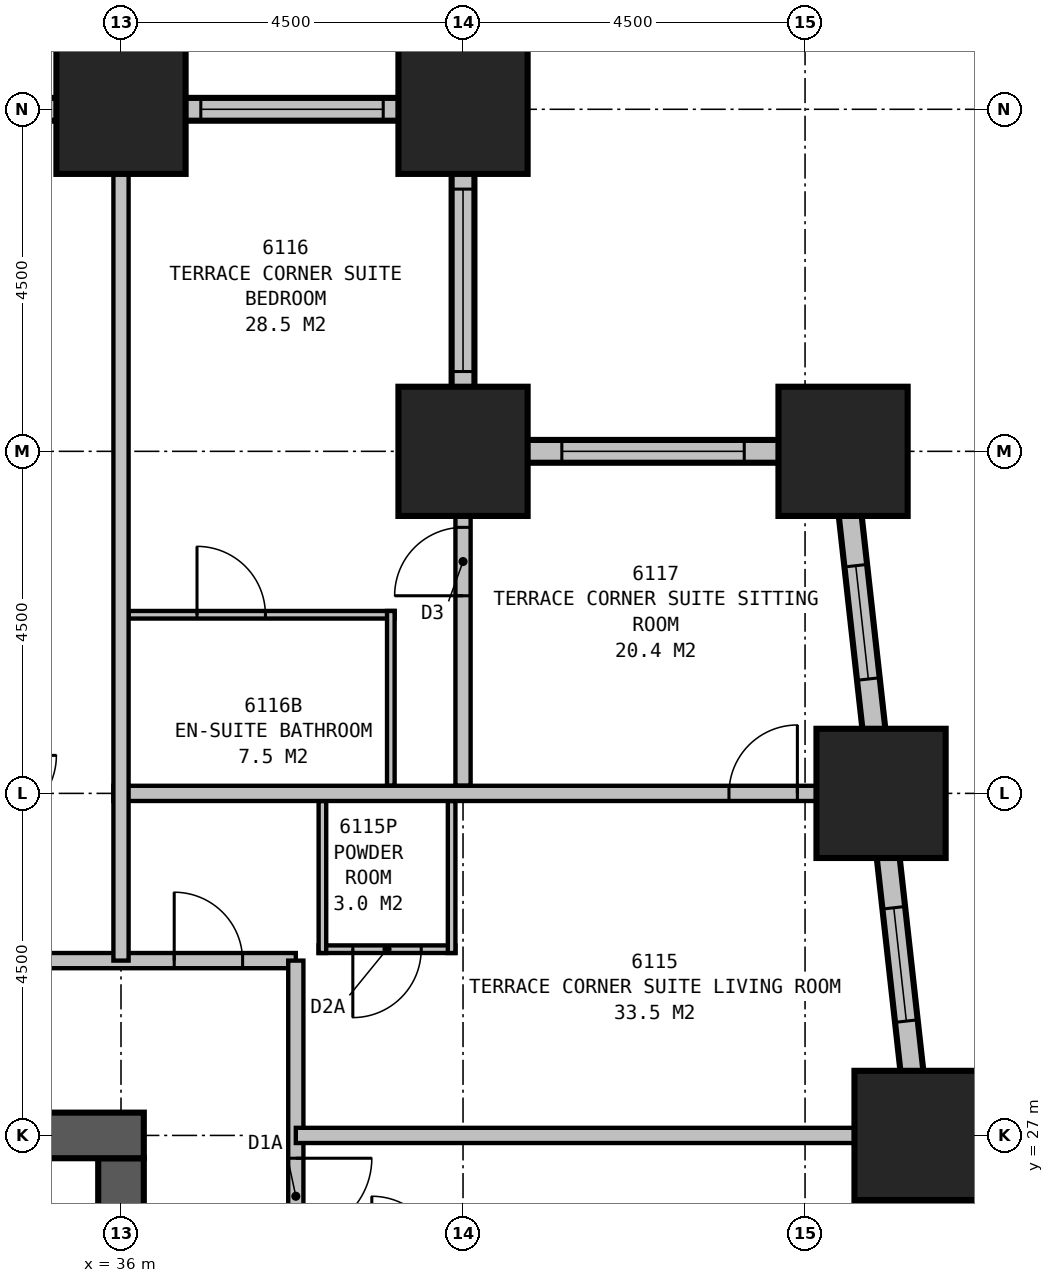
"""IFC4 building model, lengths in metres.
Left out: names, types, materials, properties, quantities, classifications, styles, units other than length and angle.
Written with IfcOpenShell. Run it as: python <this file> out.ifc"""

import sys

from ifc_helpers import new_model, si_unit, direction, frame, frame_2d, origin, origin_2d, place, context, subcontext, project, spatial, rectangle, extrude, element, fill, save


model = new_model("IFC4")
c1 = context("Model", 3, precision=1e-05, world=origin(), true_north=direction((0.0, 1.0)))
c2 = subcontext(c1, "Body", "Model", "MODEL_VIEW")
j1 = project(units=[si_unit("LENGTHUNIT", "METRE"), si_unit("PLANEANGLEUNIT", "RADIAN")], contexts=[c1])
p1 = place(None, origin())
s1 = spatial("IfcSite", under=j1, at=p1, CompositionType="ELEMENT")
p2 = place(p1, origin())
s2 = spatial("IfcBuilding", under=s1, at=p2, CompositionType="ELEMENT")
p3 = place(p2, frame((0.0, 0.0, 236.9)))
s3 = spatial("IfcBuildingStorey", under=s2, at=p3, CompositionType="ELEMENT", Elevation=236.9)
for number, where, z_axis, x_axis in (
    (1, (46.5, 27.0, 0.0), (0.0, 0.0, 1.0), (1.0, 0.0, 0.0)),
    (2, (46.0, 31.5, 0.0), (0.0, 0.0, 1.0), (1.0, 0.0, 0.0)),
    (3, (45.5, 36.0, 0.0), (0.0, 0.0, 1.0), (1.0, 0.0, 0.0)),
    (4, (40.5, 36.0, 0.0), (0.0, 0.0, 1.0), (1.0, 0.0, 0.0)),
    (5, (40.5, 40.5, 0.0), (0.0, 0.0, 1.0), (1.0, 0.0, 0.0)),
    (6, (36.0, 40.5, 0.0), (0.0, 0.0, 1.0), (1.0, 0.0, 0.0)),
):
    element("IfcColumn", number, at=place(p3, frame(where, z_axis=z_axis, x_axis=x_axis)), inside=s3, PredefinedType="COLUMN", context=c2, shape_type="SweptSolid", body=[
        extrude(rectangle(XDim=1.7, YDim=1.7, at=origin_2d()), origin(), (0.0, 0.0, 1.0), 3.9),
    ])
p4 = place(p3, frame((36.3, 27.0, 0.0), z_axis=(0.0, 0.0, 1.0), x_axis=(-1.0, 0.0, 0.0)))
e7 = element("IfcWall", 7, at=p4, inside=s3, PredefinedType="SHEAR", context=c2, shape_type="SweptSolid", body=[
    extrude(rectangle(XDim=23.45, YDim=0.6, at=frame_2d((11.725, 0.0))), origin(), (0.0, 0.0, 1.0), 3.9),
])
p5 = place(p4, frame((17.05, 0.0, 0.0)))
e8 = element("IfcOpeningElement", 8, at=p5, cuts=e7, PredefinedType="OPENING", context=c2, shape_type="SweptSolid", body=[
    extrude(rectangle(XDim=1.0, YDim=2.1, at=frame_2d((0.5, 1.05))), frame((0.0, 0.31, 0.0), z_axis=(0.0, -1.0, 0.0), x_axis=(1.0, 0.0, 0.0)), (0.0, 0.0, 1.0), 0.62),
])
p6 = place(p4, frame((12.05, 0.0, 0.0)))
e9 = element("IfcOpeningElement", 9, at=p6, cuts=e7, PredefinedType="OPENING", context=c2, shape_type="SweptSolid", body=[
    extrude(rectangle(XDim=1.0, YDim=2.1, at=frame_2d((0.5, 1.05))), frame((0.0, 0.31, 0.0), z_axis=(0.0, -1.0, 0.0), x_axis=(1.0, 0.0, 0.0)), (0.0, 0.0, 1.0), 0.62),
])
p7 = place(p4, frame((7.05, 0.0, 0.0)))
e10 = element("IfcOpeningElement", 10, at=p7, cuts=e7, PredefinedType="OPENING", context=c2, shape_type="SweptSolid", body=[
    extrude(rectangle(XDim=1.0, YDim=2.1, at=frame_2d((0.5, 1.05))), frame((0.0, 0.31, 0.0), z_axis=(0.0, -1.0, 0.0), x_axis=(1.0, 0.0, 0.0)), (0.0, 0.0, 1.0), 0.62),
])
p8 = place(p3, frame((36.0, 20.0, 0.0), z_axis=(0.0, 0.0, 1.0), x_axis=(0.0, 1.0, 0.0)))
e11 = element("IfcWall", 11, at=p8, inside=s3, PredefinedType="SHEAR", context=c2, shape_type="SweptSolid", body=[
    extrude(rectangle(XDim=6.7, YDim=0.6, at=frame_2d((3.35, 0.0))), origin(), (0.0, 0.0, 1.0), 3.9),
])
p9 = place(p3, frame((49.017, 4.351, 0.0), z_axis=(0.0, 0.0, 1.0), x_axis=(-0.110433201132, 0.993883548555, 0.0)))
e12 = element("IfcWall", 12, at=p9, inside=s3, PredefinedType="STANDARD", context=c2, shape_type="SweptSolid", body=[
    extrude(rectangle(XDim=31.994, YDim=0.3, at=frame_2d((15.997, 0.0))), origin(), (0.0, 0.0, 1.0), 2.5),
])
p10 = place(p9, frame((1.664, 0.0, 0.5)))
e13 = element("IfcOpeningElement", 13, at=p10, cuts=e12, PredefinedType="OPENING", context=c2, shape_type="SweptSolid", body=[
    extrude(rectangle(XDim=1.5, YDim=1.85, at=frame_2d((0.75, 0.925))), frame((0.0, 0.16, 0.0), z_axis=(0.0, -1.0, 0.0), x_axis=(1.0, 0.0, 0.0)), (0.0, 0.0, 1.0), 0.32),
])
p11 = place(p9, frame((6.192, 0.0, 0.5)))
e14 = element("IfcOpeningElement", 14, at=p11, cuts=e12, PredefinedType="OPENING", context=c2, shape_type="SweptSolid", body=[
    extrude(rectangle(XDim=1.5, YDim=1.85, at=frame_2d((0.75, 0.925))), frame((0.0, 0.16, 0.0), z_axis=(0.0, -1.0, 0.0), x_axis=(1.0, 0.0, 0.0)), (0.0, 0.0, 1.0), 0.32),
])
p12 = place(p9, frame((10.719, 0.0, 0.5)))
e15 = element("IfcOpeningElement", 15, at=p12, cuts=e12, PredefinedType="OPENING", context=c2, shape_type="SweptSolid", body=[
    extrude(rectangle(XDim=1.5, YDim=1.85, at=frame_2d((0.75, 0.925))), frame((0.0, 0.16, 0.0), z_axis=(0.0, -1.0, 0.0), x_axis=(1.0, 0.0, 0.0)), (0.0, 0.0, 1.0), 0.32),
])
p13 = place(p9, frame((15.247, 0.0, 0.5)))
e16 = element("IfcOpeningElement", 16, at=p13, cuts=e12, PredefinedType="OPENING", context=c2, shape_type="SweptSolid", body=[
    extrude(rectangle(XDim=1.5, YDim=1.85, at=frame_2d((0.75, 0.925))), frame((0.0, 0.16, 0.0), z_axis=(0.0, -1.0, 0.0), x_axis=(1.0, 0.0, 0.0)), (0.0, 0.0, 1.0), 0.32),
])
p14 = place(p9, frame((19.775, 0.0, 0.5)))
e17 = element("IfcOpeningElement", 17, at=p14, cuts=e12, PredefinedType="OPENING", context=c2, shape_type="SweptSolid", body=[
    extrude(rectangle(XDim=1.5, YDim=1.85, at=frame_2d((0.75, 0.925))), frame((0.0, 0.16, 0.0), z_axis=(0.0, -1.0, 0.0), x_axis=(1.0, 0.0, 0.0)), (0.0, 0.0, 1.0), 0.32),
])
p15 = place(p9, frame((24.302, 0.0, 0.5)))
e18 = element("IfcOpeningElement", 18, at=p15, cuts=e12, PredefinedType="OPENING", context=c2, shape_type="SweptSolid", body=[
    extrude(rectangle(XDim=1.5, YDim=1.85, at=frame_2d((0.75, 0.925))), frame((0.0, 0.16, 0.0), z_axis=(0.0, -1.0, 0.0), x_axis=(1.0, 0.0, 0.0)), (0.0, 0.0, 1.0), 0.32),
])
p16 = place(p9, frame((28.83, 0.0, 0.5)))
e19 = element("IfcOpeningElement", 19, at=p16, cuts=e12, PredefinedType="OPENING", context=c2, shape_type="SweptSolid", body=[
    extrude(rectangle(XDim=1.5, YDim=1.85, at=frame_2d((0.75, 0.925))), frame((0.0, 0.16, 0.0), z_axis=(0.0, -1.0, 0.0), x_axis=(1.0, 0.0, 0.0)), (0.0, 0.0, 1.0), 0.32),
])
p17 = place(p3, frame((45.65, 36.0, 0.0), z_axis=(0.0, 0.0, 1.0), x_axis=(-1.0, 0.0, 0.0)))
e20 = element("IfcWall", 20, at=p17, inside=s3, PredefinedType="STANDARD", context=c2, shape_type="SweptSolid", body=[
    extrude(rectangle(XDim=5.3, YDim=0.3, at=frame_2d((2.65, 0.0))), origin(), (0.0, 0.0, 1.0), 2.5),
])
p18 = place(p17, frame((1.45, 0.0, 0.5)))
e21 = element("IfcOpeningElement", 21, at=p18, cuts=e20, PredefinedType="OPENING", context=c2, shape_type="SweptSolid", body=[
    extrude(rectangle(XDim=2.4, YDim=1.85, at=frame_2d((1.2, 0.925))), frame((0.0, 0.16, 0.0), z_axis=(0.0, -1.0, 0.0), x_axis=(1.0, 0.0, 0.0)), (0.0, 0.0, 1.0), 0.32),
])
p19 = place(p3, frame((40.5, 35.85, 0.0), z_axis=(0.0, 0.0, 1.0), x_axis=(0.0, 1.0, 0.0)))
e22 = element("IfcWall", 22, at=p19, inside=s3, PredefinedType="STANDARD", context=c2, shape_type="SweptSolid", body=[
    extrude(rectangle(XDim=4.8, YDim=0.3, at=frame_2d((2.4, 0.0))), origin(), (0.0, 0.0, 1.0), 2.5),
])
p20 = place(p19, frame((1.2, 0.0, 0.5)))
e23 = element("IfcOpeningElement", 23, at=p20, cuts=e22, PredefinedType="OPENING", context=c2, shape_type="SweptSolid", body=[
    extrude(rectangle(XDim=2.4, YDim=1.85, at=frame_2d((1.2, 0.925))), frame((0.0, 0.16, 0.0), z_axis=(0.0, -1.0, 0.0), x_axis=(1.0, 0.0, 0.0)), (0.0, 0.0, 1.0), 0.32),
])
p21 = place(p3, frame((40.65, 40.5, 0.0), z_axis=(0.0, 0.0, 1.0), x_axis=(-1.0, 0.0, 0.0)))
e24 = element("IfcWall", 24, at=p21, inside=s3, PredefinedType="STANDARD", context=c2, shape_type="SweptSolid", body=[
    extrude(rectangle(XDim=27.3, YDim=0.3, at=frame_2d((13.65, 0.0))), origin(), (0.0, 0.0, 1.0), 2.5),
])
p22 = place(p21, frame((1.2, 0.0, 0.5)))
e25 = element("IfcOpeningElement", 25, at=p22, cuts=e24, PredefinedType="OPENING", context=c2, shape_type="SweptSolid", body=[
    extrude(rectangle(XDim=2.4, YDim=1.85, at=frame_2d((1.2, 0.925))), frame((0.0, 0.16, 0.0), z_axis=(0.0, -1.0, 0.0), x_axis=(1.0, 0.0, 0.0)), (0.0, 0.0, 1.0), 0.32),
])
p23 = place(p21, frame((5.7, 0.0, 0.5)))
e26 = element("IfcOpeningElement", 26, at=p23, cuts=e24, PredefinedType="OPENING", context=c2, shape_type="SweptSolid", body=[
    extrude(rectangle(XDim=2.4, YDim=1.85, at=frame_2d((1.2, 0.925))), frame((0.0, 0.16, 0.0), z_axis=(0.0, -1.0, 0.0), x_axis=(1.0, 0.0, 0.0)), (0.0, 0.0, 1.0), 0.32),
])
p24 = place(p21, frame((10.2, 0.0, 0.5)))
e27 = element("IfcOpeningElement", 27, at=p24, cuts=e24, PredefinedType="OPENING", context=c2, shape_type="SweptSolid", body=[
    extrude(rectangle(XDim=2.4, YDim=1.85, at=frame_2d((1.2, 0.925))), frame((0.0, 0.16, 0.0), z_axis=(0.0, -1.0, 0.0), x_axis=(1.0, 0.0, 0.0)), (0.0, 0.0, 1.0), 0.32),
])
p25 = place(p21, frame((14.7, 0.0, 0.5)))
e28 = element("IfcOpeningElement", 28, at=p25, cuts=e24, PredefinedType="OPENING", context=c2, shape_type="SweptSolid", body=[
    extrude(rectangle(XDim=2.4, YDim=1.85, at=frame_2d((1.2, 0.925))), frame((0.0, 0.16, 0.0), z_axis=(0.0, -1.0, 0.0), x_axis=(1.0, 0.0, 0.0)), (0.0, 0.0, 1.0), 0.32),
])
p26 = place(p21, frame((19.2, 0.0, 0.5)))
e29 = element("IfcOpeningElement", 29, at=p26, cuts=e24, PredefinedType="OPENING", context=c2, shape_type="SweptSolid", body=[
    extrude(rectangle(XDim=2.4, YDim=1.85, at=frame_2d((1.2, 0.925))), frame((0.0, 0.16, 0.0), z_axis=(0.0, -1.0, 0.0), x_axis=(1.0, 0.0, 0.0)), (0.0, 0.0, 1.0), 0.32),
])
p27 = place(p21, frame((23.7, 0.0, 0.5)))
e30 = element("IfcOpeningElement", 30, at=p27, cuts=e24, PredefinedType="OPENING", context=c2, shape_type="SweptSolid", body=[
    extrude(rectangle(XDim=2.4, YDim=1.85, at=frame_2d((1.2, 0.925))), frame((0.0, 0.16, 0.0), z_axis=(0.0, -1.0, 0.0), x_axis=(1.0, 0.0, 0.0)), (0.0, 0.0, 1.0), 0.32),
])
p28 = place(p3, frame((12.406, 29.3, 0.0), z_axis=(0.0, 0.0, 1.0), x_axis=(1.0, 0.0, 0.0)))
e31 = element("IfcWall", 31, at=p28, inside=s3, PredefinedType="PARTITIONING", context=c2, shape_type="SweptSolid", body=[
    extrude(rectangle(XDim=25.894, YDim=0.2, at=frame_2d((12.947, 0.0))), origin(), (0.0, 0.0, 1.0), 3.65),
])
p29 = place(p28, frame((0.9, 0.0, 0.0)))
e32 = element("IfcOpeningElement", 32, at=p29, cuts=e31, PredefinedType="OPENING", context=c2, shape_type="SweptSolid", body=[
    extrude(rectangle(XDim=0.9, YDim=2.1, at=frame_2d((0.45, 1.05))), frame((0.0, 0.11, 0.0), z_axis=(0.0, -1.0, 0.0), x_axis=(1.0, 0.0, 0.0)), (0.0, 0.0, 1.0), 0.22),
])
p30 = place(p28, frame((6.444, 0.0, 0.0)))
e33 = element("IfcOpeningElement", 33, at=p30, cuts=e31, PredefinedType="OPENING", context=c2, shape_type="SweptSolid", body=[
    extrude(rectangle(XDim=0.9, YDim=2.1, at=frame_2d((0.45, 1.05))), frame((0.0, 0.11, 0.0), z_axis=(0.0, -1.0, 0.0), x_axis=(1.0, 0.0, 0.0)), (0.0, 0.0, 1.0), 0.22),
])
p31 = place(p28, frame((14.644, 0.0, 0.0)))
e34 = element("IfcOpeningElement", 34, at=p31, cuts=e31, PredefinedType="OPENING", context=c2, shape_type="SweptSolid", body=[
    extrude(rectangle(XDim=0.9, YDim=2.1, at=frame_2d((0.45, 1.05))), frame((0.0, 0.11, 0.0), z_axis=(0.0, -1.0, 0.0), x_axis=(1.0, 0.0, 0.0)), (0.0, 0.0, 1.0), 0.22),
])
p32 = place(p28, frame((24.293, 0.0, 0.0)))
e35 = element("IfcOpeningElement", 35, at=p32, cuts=e31, PredefinedType="OPENING", context=c2, shape_type="SweptSolid", body=[
    extrude(rectangle(XDim=0.9, YDim=2.1, at=frame_2d((0.45, 1.05))), frame((0.0, 0.11, 0.0), z_axis=(0.0, -1.0, 0.0), x_axis=(1.0, 0.0, 0.0)), (0.0, 0.0, 1.0), 0.22),
])
p33 = place(p3, frame((38.3, 10.6, 0.0), z_axis=(0.0, 0.0, 1.0), x_axis=(0.0, 1.0, 0.0)))
e36 = element("IfcWall", 36, at=p33, inside=s3, PredefinedType="PARTITIONING", context=c2, shape_type="SweptSolid", body=[
    extrude(rectangle(XDim=18.7, YDim=0.2, at=frame_2d((9.35, 0.0))), origin(), (0.0, 0.0, 1.0), 3.65),
])
p34 = place(p33, frame((6.55, 0.0, 0.0), z_axis=(0.0, 0.0, 1.0), x_axis=(-1.0, 0.0, 0.0)))
e37 = element("IfcOpeningElement", 37, at=p34, cuts=e36, PredefinedType="OPENING", context=c2, shape_type="SweptSolid", body=[
    extrude(rectangle(XDim=0.9, YDim=2.1, at=frame_2d((0.45, 1.05))), frame((0.0, 0.11, 0.0), z_axis=(0.0, -1.0, 0.0), x_axis=(1.0, 0.0, 0.0)), (0.0, 0.0, 1.0), 0.22),
])
p35 = place(p33, frame((16.1, 0.0, 0.0), z_axis=(0.0, 0.0, 1.0), x_axis=(-1.0, 0.0, 0.0)))
e38 = element("IfcOpeningElement", 38, at=p35, cuts=e36, PredefinedType="OPENING", context=c2, shape_type="SweptSolid", body=[
    extrude(rectangle(XDim=1.0, YDim=2.1, at=frame_2d((0.5, 1.05))), frame((0.0, 0.11, 0.0), z_axis=(0.0, -1.0, 0.0), x_axis=(1.0, 0.0, 0.0)), (0.0, 0.0, 1.0), 0.22),
])
p36 = place(p3, frame((38.3, 27.0, 0.0), z_axis=(0.0, 0.0, 1.0), x_axis=(1.0, 0.0, 0.0)))
e39 = element("IfcWall", 39, at=p36, inside=s3, PredefinedType="PARTITIONING", context=c2, shape_type="SweptSolid", body=[
    extrude(rectangle(XDim=7.977, YDim=0.2, at=frame_2d((3.988, 0.0))), origin(), (0.0, 0.0, 1.0), 2.35),
])
p37 = place(p3, frame((36.0, 29.3, 0.0), z_axis=(0.0, 0.0, 1.0), x_axis=(0.0, 1.0, 0.0)))
e40 = element("IfcWall", 40, at=p37, inside=s3, PredefinedType="PARTITIONING", context=c2, shape_type="SweptSolid", body=[
    extrude(rectangle(XDim=11.2, YDim=0.2, at=frame_2d((5.6, 0.0))), origin(), (0.0, 0.0, 1.0), 2.65),
])
p38 = place(p3, frame((35.9, 31.5, 0.0), z_axis=(0.0, 0.0, 1.0), x_axis=(1.0, 0.0, 0.0)))
e41 = element("IfcWall", 41, at=p38, inside=s3, PredefinedType="PARTITIONING", context=c2, shape_type="SweptSolid", body=[
    extrude(rectangle(XDim=10.099, YDim=0.2, at=frame_2d((5.05, 0.0))), origin(), (0.0, 0.0, 1.0), 3.65),
])
p39 = place(p38, frame((8.099, 0.0, 0.0)))
e42 = element("IfcOpeningElement", 42, at=p39, cuts=e41, PredefinedType="OPENING", context=c2, shape_type="SweptSolid", body=[
    extrude(rectangle(XDim=0.9, YDim=2.1, at=frame_2d((0.45, 1.05))), frame((0.0, 0.11, 0.0), z_axis=(0.0, -1.0, 0.0), x_axis=(1.0, 0.0, 0.0)), (0.0, 0.0, 1.0), 0.22),
])
p40 = place(p3, frame((40.35, 31.4, 0.0), z_axis=(0.0, 0.0, 1.0), x_axis=(0.0, -1.0, 0.0)))
e43 = element("IfcWall", 43, at=p40, inside=s3, PredefinedType="PLUMBINGWALL", context=c2, shape_type="SweptSolid", body=[
    extrude(rectangle(XDim=2.0, YDim=0.1, at=frame_2d((1.0, 0.0))), origin(), (0.0, 0.0, 1.0), 2.65),
])
p41 = place(p3, frame((38.65, 31.4, 0.0), z_axis=(0.0, 0.0, 1.0), x_axis=(0.0, -1.0, 0.0)))
e44 = element("IfcWall", 44, at=p41, inside=s3, PredefinedType="PLUMBINGWALL", context=c2, shape_type="SweptSolid", body=[
    extrude(rectangle(XDim=2.0, YDim=0.1, at=frame_2d((1.0, 0.0))), origin(), (0.0, 0.0, 1.0), 3.65),
])
p42 = place(p3, frame((38.6, 29.45, 0.0), z_axis=(0.0, 0.0, 1.0), x_axis=(1.0, 0.0, 0.0)))
e45 = element("IfcWall", 45, at=p42, inside=s3, PredefinedType="PLUMBINGWALL", context=c2, shape_type="SweptSolid", body=[
    extrude(rectangle(XDim=1.8, YDim=0.1, at=frame_2d((0.9, 0.0))), origin(), (0.0, 0.0, 1.0), 3.65),
])
p43 = place(p42, frame((1.35, 0.0, 0.0), z_axis=(0.0, 0.0, 1.0), x_axis=(-1.0, 0.0, 0.0)))
e46 = element("IfcOpeningElement", 46, at=p43, cuts=e45, PredefinedType="OPENING", context=c2, shape_type="SweptSolid", body=[
    extrude(rectangle(XDim=0.9, YDim=2.1, at=frame_2d((0.45, 1.05))), frame((0.0, 0.06, 0.0), z_axis=(0.0, -1.0, 0.0), x_axis=(1.0, 0.0, 0.0)), (0.0, 0.0, 1.0), 0.12),
])
p44 = place(p3, frame((40.5, 31.6, 0.0), z_axis=(0.0, 0.0, 1.0), x_axis=(0.0, 1.0, 0.0)))
e47 = element("IfcWall", 47, at=p44, inside=s3, PredefinedType="PARTITIONING", context=c2, shape_type="SweptSolid", body=[
    extrude(rectangle(XDim=4.4, YDim=0.2, at=frame_2d((2.2, 0.0))), origin(), (0.0, 0.0, 1.0), 2.65),
])
p45 = place(p44, frame((2.5, 0.0, 0.0)))
e48 = element("IfcOpeningElement", 48, at=p45, cuts=e47, PredefinedType="OPENING", context=c2, shape_type="SweptSolid", body=[
    extrude(rectangle(XDim=0.9, YDim=2.1, at=frame_2d((0.45, 1.05))), frame((0.0, 0.11, 0.0), z_axis=(0.0, -1.0, 0.0), x_axis=(1.0, 0.0, 0.0)), (0.0, 0.0, 1.0), 0.22),
])
p46 = place(p3, frame((39.55, 31.6, 0.0), z_axis=(0.0, 0.0, 1.0), x_axis=(0.0, 1.0, 0.0)))
e49 = element("IfcWall", 49, at=p46, inside=s3, PredefinedType="PLUMBINGWALL", context=c2, shape_type="SweptSolid", body=[
    extrude(rectangle(XDim=2.3, YDim=0.1, at=frame_2d((1.15, 0.0))), origin(), (0.0, 0.0, 1.0), 3.65),
])
p47 = place(p3, frame((36.1, 33.85, 0.0), z_axis=(0.0, 0.0, 1.0), x_axis=(1.0, 0.0, 0.0)))
e50 = element("IfcWall", 50, at=p47, inside=s3, PredefinedType="PLUMBINGWALL", context=c2, shape_type="SweptSolid", body=[
    extrude(rectangle(XDim=3.5, YDim=0.1, at=frame_2d((1.75, 0.0))), origin(), (0.0, 0.0, 1.0), 3.65),
])
p48 = place(p47, frame((0.9, 0.0, 0.0)))
e51 = element("IfcOpeningElement", 51, at=p48, cuts=e50, PredefinedType="OPENING", context=c2, shape_type="SweptSolid", body=[
    extrude(rectangle(XDim=0.9, YDim=2.1, at=frame_2d((0.45, 1.05))), frame((0.0, 0.06, 0.0), z_axis=(0.0, -1.0, 0.0), x_axis=(1.0, 0.0, 0.0)), (0.0, 0.0, 1.0), 0.12),
])
p49 = place(p15, origin())
e52 = element("IfcWindow", 52, at=p49, inside=s3, PartitioningType="SINGLE_PANEL", PredefinedType="WINDOW", context=c2, shape_type="SweptSolid", body=[
    extrude(rectangle(XDim=1.5, YDim=1.85, at=frame_2d((0.75, 0.925))), frame((0.0, 0.03, 0.0), z_axis=(0.0, -1.0, 0.0), x_axis=(1.0, 0.0, 0.0)), (0.0, 0.0, 1.0), 0.06),
])
fill(e18, e52)
p50 = place(p16, origin())
e53 = element("IfcWindow", 53, at=p50, inside=s3, PartitioningType="SINGLE_PANEL", PredefinedType="WINDOW", context=c2, shape_type="SweptSolid", body=[
    extrude(rectangle(XDim=1.5, YDim=1.85, at=frame_2d((0.75, 0.925))), frame((0.0, 0.03, 0.0), z_axis=(0.0, -1.0, 0.0), x_axis=(1.0, 0.0, 0.0)), (0.0, 0.0, 1.0), 0.06),
])
fill(e19, e53)
p51 = place(p18, origin())
e54 = element("IfcWindow", 54, at=p51, inside=s3, PartitioningType="SINGLE_PANEL", PredefinedType="WINDOW", context=c2, shape_type="SweptSolid", body=[
    extrude(rectangle(XDim=2.4, YDim=1.85, at=frame_2d((1.2, 0.925))), frame((0.0, 0.03, 0.0), z_axis=(0.0, -1.0, 0.0), x_axis=(1.0, 0.0, 0.0)), (0.0, 0.0, 1.0), 0.06),
])
fill(e21, e54)
p52 = place(p20, origin())
e55 = element("IfcWindow", 55, at=p52, inside=s3, PartitioningType="SINGLE_PANEL", PredefinedType="WINDOW", context=c2, shape_type="SweptSolid", body=[
    extrude(rectangle(XDim=2.4, YDim=1.85, at=frame_2d((1.2, 0.925))), frame((0.0, 0.03, 0.0), z_axis=(0.0, -1.0, 0.0), x_axis=(1.0, 0.0, 0.0)), (0.0, 0.0, 1.0), 0.06),
])
fill(e23, e55)
p53 = place(p22, origin())
e56 = element("IfcWindow", 56, at=p53, inside=s3, PartitioningType="SINGLE_PANEL", PredefinedType="WINDOW", context=c2, shape_type="SweptSolid", body=[
    extrude(rectangle(XDim=2.4, YDim=1.85, at=frame_2d((1.2, 0.925))), frame((0.0, 0.03, 0.0), z_axis=(0.0, -1.0, 0.0), x_axis=(1.0, 0.0, 0.0)), (0.0, 0.0, 1.0), 0.06),
])
fill(e25, e56)
p54 = place(p32, origin())
e57 = element("IfcDoor", 57, at=p54, inside=s3, OperationType="SINGLE_SWING_LEFT", PredefinedType="DOOR", context=c2, shape_type="SweptSolid", body=[
    extrude(rectangle(XDim=0.9, YDim=2.1, at=frame_2d((0.45, 1.05))), frame((0.0, 0.025, 0.0), z_axis=(0.0, -1.0, 0.0), x_axis=(1.0, 0.0, 0.0)), (0.0, 0.0, 1.0), 0.05),
])
fill(e35, e57)
p55 = place(p35, origin())
e58 = element("IfcDoor", 58, at=p55, inside=s3, OperationType="SINGLE_SWING_LEFT", PredefinedType="DOOR", context=c2, shape_type="SweptSolid", body=[
    extrude(rectangle(XDim=1.0, YDim=2.1, at=frame_2d((0.5, 1.05))), frame((0.0, 0.025, 0.0), z_axis=(0.0, -1.0, 0.0), x_axis=(1.0, 0.0, 0.0)), (0.0, 0.0, 1.0), 0.05),
])
fill(e38, e58)
p56 = place(p39, origin())
e59 = element("IfcDoor", 59, at=p56, inside=s3, OperationType="SINGLE_SWING_RIGHT", PredefinedType="DOOR", context=c2, shape_type="SweptSolid", body=[
    extrude(rectangle(XDim=0.9, YDim=2.1, at=frame_2d((0.45, 1.05))), frame((0.0, 0.025, 0.0), z_axis=(0.0, -1.0, 0.0), x_axis=(1.0, 0.0, 0.0)), (0.0, 0.0, 1.0), 0.05),
])
fill(e42, e59)
p57 = place(p43, origin())
e60 = element("IfcDoor", 60, at=p57, inside=s3, OperationType="SINGLE_SWING_RIGHT", PredefinedType="DOOR", context=c2, shape_type="SweptSolid", body=[
    extrude(rectangle(XDim=0.9, YDim=2.1, at=frame_2d((0.45, 1.05))), frame((0.0, 0.025, 0.0), z_axis=(0.0, -1.0, 0.0), x_axis=(1.0, 0.0, 0.0)), (0.0, 0.0, 1.0), 0.05),
])
fill(e46, e60)
p58 = place(p45, origin())
e61 = element("IfcDoor", 61, at=p58, inside=s3, OperationType="SINGLE_SWING_LEFT", PredefinedType="DOOR", context=c2, shape_type="SweptSolid", body=[
    extrude(rectangle(XDim=0.9, YDim=2.1, at=frame_2d((0.45, 1.05))), frame((0.0, 0.025, 0.0), z_axis=(0.0, -1.0, 0.0), x_axis=(1.0, 0.0, 0.0)), (0.0, 0.0, 1.0), 0.05),
])
fill(e48, e61)
p59 = place(p48, origin())
e62 = element("IfcDoor", 62, at=p59, inside=s3, OperationType="SINGLE_SWING_LEFT", PredefinedType="DOOR", context=c2, shape_type="SweptSolid", body=[
    extrude(rectangle(XDim=0.9, YDim=2.1, at=frame_2d((0.45, 1.05))), frame((0.0, 0.025, 0.0), z_axis=(0.0, -1.0, 0.0), x_axis=(1.0, 0.0, 0.0)), (0.0, 0.0, 1.0), 0.05),
])
fill(e51, e62)
save(model, sys.argv[1])
